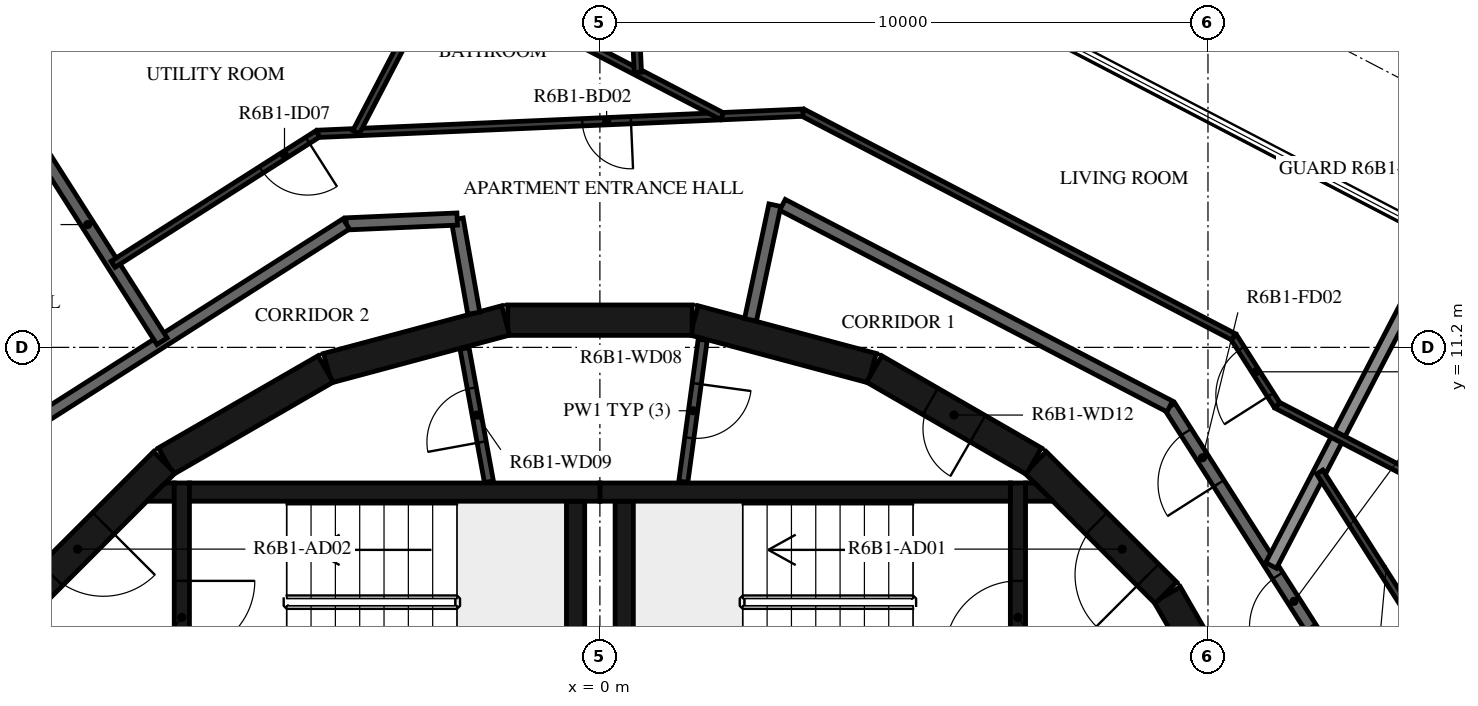
"""IFC4 building model, lengths in metres.
Left out: names, types, materials, properties, quantities, classifications, styles, units other than length and angle.
Written with IfcOpenShell. Run it as: python <this file> out.ifc"""

import sys

from ifc_helpers import new_model, si_unit, direction, frame, frame_2d, origin, place, context, subcontext, project, spatial, polyline, rectangle, outline, extrude, element, fill, save


model = new_model("IFC4")
c1 = context("Model", 3, precision=1e-05, world=origin(), true_north=direction((0.0, 1.0)))
c2 = subcontext(c1, "Body", "Model", "MODEL_VIEW")
j1 = project(units=[si_unit("LENGTHUNIT", "METRE"), si_unit("PLANEANGLEUNIT", "RADIAN")], contexts=[c1])
p1 = place(None, origin())
s1 = spatial("IfcSite", under=j1, at=p1, CompositionType="ELEMENT")
p2 = place(p1, origin())
s2 = spatial("IfcBuilding", under=s1, at=p2, CompositionType="ELEMENT")
p3 = place(p2, frame((0.0, 0.0, 237.2)))
s3 = spatial("IfcBuildingStorey", under=s2, at=p3, CompositionType="ELEMENT", Elevation=237.2)
p4 = place(p3, frame((10.845, 4.51, 0.0), z_axis=(0.0, 0.0, 1.0), x_axis=(-0.500087131594, 0.865975092491, 0.0)))
e1 = element("IfcWall", 1, at=p4, inside=s3, PredefinedType="SHEAR", context=c2, shape_type="SweptSolid", body=[
    extrude(rectangle(XDim=3.033, YDim=0.5, at=frame_2d((1.516, 0.0))), origin(), (0.0, 0.0, 1.0), 3.12),
])
p5 = place(p3, frame((9.308, 7.164, 0.0), z_axis=(0.0, 0.0, 1.0), x_axis=(-0.707106781187, 0.707106781187, 0.0)))
e2 = element("IfcWall", 2, at=p5, inside=s3, PredefinedType="SHEAR", context=c2, shape_type="SweptSolid", body=[
    extrude(rectangle(XDim=3.032, YDim=0.5, at=frame_2d((1.516, 0.0))), origin(), (0.0, 0.0, 1.0), 3.12),
])
p6 = place(p5, frame((0.416, 0.0, 0.0)))
e3 = element("IfcOpeningElement", 3, at=p6, cuts=e2, PredefinedType="OPENING", context=c2, shape_type="SweptSolid", body=[
    extrude(rectangle(XDim=1.2, YDim=2.1, at=frame_2d((0.6, 1.05))), frame((0.0, 0.26, 0.0), z_axis=(0.0, -1.0, 0.0), x_axis=(1.0, 0.0, 0.0)), (0.0, 0.0, 1.0), 0.52),
])
p7 = place(p3, frame((7.137, 9.329, 0.0), z_axis=(0.0, 0.0, 1.0), x_axis=(-0.865975092491, 0.500087131594, 0.0)))
e4 = element("IfcWall", 4, at=p7, inside=s3, PredefinedType="SHEAR", context=c2, shape_type="SweptSolid", body=[
    extrude(rectangle(XDim=3.033, YDim=0.5, at=frame_2d((1.516, 0.0))), origin(), (0.0, 0.0, 1.0), 3.12),
])
p8 = place(p7, frame((1.066, 0.0, 0.0)))
e5 = element("IfcOpeningElement", 5, at=p8, cuts=e4, PredefinedType="OPENING", context=c2, shape_type="SweptSolid", body=[
    extrude(rectangle(XDim=0.9, YDim=2.1, at=frame_2d((0.45, 1.05))), frame((0.0, 0.26, 0.0), z_axis=(0.0, -1.0, 0.0), x_axis=(1.0, 0.0, 0.0)), (0.0, 0.0, 1.0), 0.52),
])
for number, where, z_axis, x_axis in (
    (6, (4.479, 10.858, 0.0), (0.0, 0.0, 1.0), (-0.966, 0.259, 0.0)),
    (7, (1.516, 11.647, 0.0), (0.0, 0.0, 1.0), (-1.0, 0.0, 0.0)),
    (8, (-1.55, 11.643, 0.0), (0.0, 0.0, 1.0), (-0.966, -0.259, 0.0)),
    (9, (-4.51, 10.845, 0.0), (0.0, 0.0, 1.0), (-0.866, -0.5, 0.0)),
):
    element("IfcWall", number, at=place(p3, frame(where, z_axis=z_axis, x_axis=x_axis)), inside=s3, PredefinedType="SHEAR", context=c2, shape_type="SweptSolid", body=[
        extrude(rectangle(XDim=3.033, YDim=0.5, at=frame_2d((1.516, 0.0))), origin(), (0.0, 0.0, 1.0), 3.12),
    ])
p9 = place(p3, frame((-7.164, 9.308, 0.0), z_axis=(0.0, 0.0, 1.0), x_axis=(-0.707106781187, -0.707106781187, 0.0)))
e10 = element("IfcWall", 10, at=p9, inside=s3, PredefinedType="SHEAR", context=c2, shape_type="SweptSolid", body=[
    extrude(rectangle(XDim=3.032, YDim=0.5, at=frame_2d((1.516, 0.0))), origin(), (0.0, 0.0, 1.0), 3.12),
])
p10 = place(p9, frame((1.416, 0.0, 0.0)))
e11 = element("IfcOpeningElement", 11, at=p10, cuts=e10, PredefinedType="OPENING", context=c2, shape_type="SweptSolid", body=[
    extrude(rectangle(XDim=1.2, YDim=2.1, at=frame_2d((0.6, 1.05))), frame((0.0, 0.26, 0.0), z_axis=(0.0, -1.0, 0.0), x_axis=(1.0, 0.0, 0.0)), (0.0, 0.0, 1.0), 0.52),
])
p11 = place(p3, frame((0.0, 8.82, 0.0), z_axis=(0.0, 0.0, 1.0), x_axis=(1.0, 0.0, 0.0)))
e12 = element("IfcWall", 12, at=p11, inside=s3, PredefinedType="SHEAR", context=c2, shape_type="SweptSolid", body=[
    extrude(rectangle(XDim=6.75, YDim=0.3, at=frame_2d((3.375, 0.0))), origin(), (0.0, 0.0, 1.0), 3.12),
])
p12 = place(p3, frame((0.4, 5.35, 0.0), z_axis=(0.0, 0.0, 1.0), x_axis=(0.0, 1.0, 0.0)))
e13 = element("IfcWall", 13, at=p12, inside=s3, PredefinedType="SHEAR", context=c2, shape_type="SweptSolid", body=[
    extrude(rectangle(XDim=3.32, YDim=0.3, at=frame_2d((1.66, 0.0))), origin(), (0.0, 0.0, 1.0), 3.12),
])
p13 = place(p3, frame((6.875, 5.05, 0.0), z_axis=(0.0, 0.0, 1.0), x_axis=(0.0, 1.0, 0.0)))
e14 = element("IfcWall", 14, at=p13, inside=s3, PredefinedType="SHEAR", context=c2, shape_type="SweptSolid", body=[
    extrude(rectangle(XDim=3.92, YDim=0.25, at=frame_2d((1.96, 0.0))), origin(), (0.0, 0.0, 1.0), 3.12),
])
p14 = place(p13, frame((1.11, 0.0, 0.0)))
e15 = element("IfcOpeningElement", 15, at=p14, cuts=e14, PredefinedType="OPENING", context=c2, shape_type="SweptSolid", body=[
    extrude(rectangle(XDim=1.2, YDim=2.1, at=frame_2d((0.6, 1.05))), frame((0.0, 0.135, 0.0), z_axis=(0.0, -1.0, 0.0), x_axis=(1.0, 0.0, 0.0)), (0.0, 0.0, 1.0), 0.27),
])
p15 = place(p3, origin())
e16 = element("IfcWall", 16, at=p15, inside=s3, PredefinedType="SHEAR", context=c2, shape_type="SweptSolid", body=[
    extrude(outline(polyline([(7.448, 8.67), (7.0, 8.67), (7.0, 8.97), (7.148, 8.97), (7.448, 8.67)])), origin(), (0.0, 0.0, 1.0), 3.12),
])
p16 = place(p3, frame((-6.75, 8.82, 0.0), z_axis=(0.0, 0.0, 1.0), x_axis=(1.0, 0.0, 0.0)))
e17 = element("IfcWall", 17, at=p16, inside=s3, PredefinedType="SHEAR", context=c2, shape_type="SweptSolid", body=[
    extrude(rectangle(XDim=6.75, YDim=0.3, at=frame_2d((3.375, 0.0))), origin(), (0.0, 0.0, 1.0), 3.12),
])
p17 = place(p3, frame((-0.4, 5.35, 0.0), z_axis=(0.0, 0.0, 1.0), x_axis=(0.0, 1.0, 0.0)))
e18 = element("IfcWall", 18, at=p17, inside=s3, PredefinedType="SHEAR", context=c2, shape_type="SweptSolid", body=[
    extrude(rectangle(XDim=3.32, YDim=0.3, at=frame_2d((1.66, 0.0))), origin(), (0.0, 0.0, 1.0), 3.12),
])
p18 = place(p3, frame((-6.875, 8.97, 0.0), z_axis=(0.0, 0.0, 1.0), x_axis=(0.0, -1.0, 0.0)))
e19 = element("IfcWall", 19, at=p18, inside=s3, PredefinedType="SHEAR", context=c2, shape_type="SweptSolid", body=[
    extrude(rectangle(XDim=3.92, YDim=0.25, at=frame_2d((1.96, 0.0))), origin(), (0.0, 0.0, 1.0), 3.12),
])
p19 = place(p18, frame((1.61, 0.0, 0.0)))
e20 = element("IfcOpeningElement", 20, at=p19, cuts=e19, PredefinedType="OPENING", context=c2, shape_type="SweptSolid", body=[
    extrude(rectangle(XDim=1.2, YDim=2.1, at=frame_2d((0.6, 1.05))), frame((0.0, 0.135, 0.0), z_axis=(0.0, -1.0, 0.0), x_axis=(1.0, 0.0, 0.0)), (0.0, 0.0, 1.0), 0.27),
])
p20 = place(p3, origin())
e21 = element("IfcWall", 21, at=p20, inside=s3, PredefinedType="SHEAR", context=c2, shape_type="SweptSolid", body=[
    extrude(outline(polyline([(-7.148, 8.97), (-7.0, 8.97), (-7.0, 8.67), (-7.448, 8.67), (-7.148, 8.97)])), origin(), (0.0, 0.0, 1.0), 3.12),
])
p21 = place(p3, frame((1.691, 11.326, 0.0), z_axis=(0.0, 0.0, 1.0), x_axis=(-0.135344253201, -0.990798633994, 0.0)))
e22 = element("IfcWall", 22, at=p21, inside=s3, PredefinedType="PARTITIONING", context=c2, shape_type="SweptSolid", body=[
    extrude(rectangle(XDim=2.358, YDim=0.15, at=frame_2d((1.179, 0.0))), origin(), (0.0, 0.0, 1.0), 3.12),
])
p22 = place(p21, frame((0.729, 0.0, 0.0)))
e23 = element("IfcOpeningElement", 23, at=p22, cuts=e22, PredefinedType="OPENING", context=c2, shape_type="SweptSolid", body=[
    extrude(rectangle(XDim=0.9, YDim=2.1, at=frame_2d((0.45, 1.05))), frame((0.0, 0.085, 0.0), z_axis=(0.0, -1.0, 0.0), x_axis=(1.0, 0.0, 0.0)), (0.0, 0.0, 1.0), 0.17),
])
p23 = place(p3, frame((-1.825, 8.99, 0.0), z_axis=(0.0, 0.0, 1.0), x_axis=(-0.179955206115, 0.983674805915, 0.0)))
e24 = element("IfcWall", 24, at=p23, inside=s3, PredefinedType="PARTITIONING", context=c2, shape_type="SweptSolid", body=[
    extrude(rectangle(XDim=2.229, YDim=0.15, at=frame_2d((1.115, 0.0))), origin(), (0.0, 0.0, 1.0), 3.12),
])
p24 = place(p23, frame((0.665, 0.0, 0.0)))
e25 = element("IfcOpeningElement", 25, at=p24, cuts=e24, PredefinedType="OPENING", context=c2, shape_type="SweptSolid", body=[
    extrude(rectangle(XDim=0.9, YDim=2.1, at=frame_2d((0.45, 1.05))), frame((0.0, 0.085, 0.0), z_axis=(0.0, -1.0, 0.0), x_axis=(1.0, 0.0, 0.0)), (0.0, 0.0, 1.0), 0.17),
])
p25 = place(p3, frame((13.231, 4.172, 0.0), z_axis=(0.0, 0.0, 1.0), x_axis=(-0.537304397561, 0.843388394728, 0.0)))
e26 = element("IfcWall", 26, at=p25, inside=s3, PredefinedType="STANDARD", context=c2, shape_type="SweptSolid", body=[
    extrude(rectangle(XDim=7.181, YDim=0.2, at=frame_2d((3.59, 0.0))), origin(), (0.0, 0.0, 1.0), 3.12),
])
p26 = place(p25, frame((2.881, 0.0, 0.0)))
e27 = element("IfcOpeningElement", 27, at=p26, cuts=e26, PredefinedType="OPENING", context=c2, shape_type="SweptSolid", body=[
    extrude(rectangle(XDim=1.0, YDim=2.1, at=frame_2d((0.5, 1.05))), frame((0.0, 0.11, 0.0), z_axis=(0.0, -1.0, 0.0), x_axis=(1.0, 0.0, 0.0)), (0.0, 0.0, 1.0), 0.22),
])
p27 = place(p25, frame((5.681, 0.0, 0.0)))
e28 = element("IfcOpeningElement", 28, at=p27, cuts=e26, PredefinedType="OPENING", context=c2, shape_type="SweptSolid", body=[
    extrude(rectangle(XDim=1.0, YDim=2.1, at=frame_2d((0.5, 1.05))), frame((0.0, 0.11, 0.0), z_axis=(0.0, -1.0, 0.0), x_axis=(1.0, 0.0, 0.0)), (0.0, 0.0, 1.0), 0.22),
])
p28 = place(p3, frame((9.372, 10.228, 0.0), z_axis=(0.0, 0.0, 1.0), x_axis=(-0.887005184532, 0.461759464021, 0.0)))
e29 = element("IfcWall", 29, at=p28, inside=s3, PredefinedType="STANDARD", context=c2, shape_type="SweptSolid", body=[
    extrude(rectangle(XDim=7.181, YDim=0.2, at=frame_2d((3.591, 0.0))), origin(), (0.0, 0.0, 1.0), 3.12),
])
p29 = place(p3, frame((2.878, 13.538, 0.0), z_axis=(0.0, 0.0, 1.0), x_axis=(-0.207893604596, -0.978151444904, 0.0)))
e30 = element("IfcWall", 30, at=p29, inside=s3, PredefinedType="STANDARD", context=c2, shape_type="SweptSolid", body=[
    extrude(rectangle(XDim=1.927, YDim=0.2, at=frame_2d((0.963, 0.0))), origin(), (0.0, 0.0, 1.0), 3.12),
])
p30 = place(p3, frame((-2.074, 11.761, 0.0), z_axis=(0.0, 0.0, 1.0), x_axis=(-0.173679082312, 0.984802303189, 0.0)))
e31 = element("IfcWall", 31, at=p30, inside=s3, PredefinedType="STANDARD", context=c2, shape_type="SweptSolid", body=[
    extrude(rectangle(XDim=1.573, YDim=0.2, at=frame_2d((0.787, 0.0))), origin(), (0.0, 0.0, 1.0), 3.12),
])
p31 = place(p3, frame((-2.347, 13.31, 0.0), z_axis=(0.0, 0.0, 1.0), x_axis=(-0.999050095671, -0.043576442492, 0.0)))
e32 = element("IfcWall", 32, at=p31, inside=s3, PredefinedType="STANDARD", context=c2, shape_type="SweptSolid", body=[
    extrude(rectangle(XDim=1.826, YDim=0.2, at=frame_2d((0.913, 0.0))), origin(), (0.0, 0.0, 1.0), 3.12),
])
p32 = place(p3, frame((-4.172, 13.231, 0.0), z_axis=(0.0, 0.0, 1.0), x_axis=(-0.843388394728, -0.537304397561, 0.0)))
e33 = element("IfcWall", 33, at=p32, inside=s3, PredefinedType="STANDARD", context=c2, shape_type="SweptSolid", body=[
    extrude(rectangle(XDim=7.181, YDim=0.2, at=frame_2d((3.59, 0.0))), origin(), (0.0, 0.0, 1.0), 3.12),
])
p33 = place(p3, frame((13.801, 12.922, 0.0), z_axis=(0.0, 0.0, 1.0), x_axis=(-0.461726485624, -0.887022351733, 0.0)))
e34 = element("IfcWall", 34, at=p33, inside=s3, PredefinedType="STANDARD", context=c2, shape_type="SweptSolid", body=[
    extrude(rectangle(XDim=5.984, YDim=0.2, at=frame_2d((2.992, 0.0))), origin(), (0.0, 0.0, 1.0), 2.73),
])
p34 = place(p3, frame((-9.645, 15.138, 0.0), z_axis=(0.0, 0.0, 1.0), x_axis=(0.537267800866, -0.84341170857, 0.0)))
e35 = element("IfcWall", 35, at=p34, inside=s3, PredefinedType="STANDARD", context=c2, shape_type="SweptSolid", body=[
    extrude(rectangle(XDim=4.55, YDim=0.2, at=frame_2d((2.275, 0.0))), origin(), (0.0, 0.0, 1.0), 3.12),
])
p35 = place(p3, frame((14.58, 4.845, 0.0), z_axis=(0.0, 0.0, 1.0), x_axis=(-0.537283960997, 0.84340141407, 0.0)))
e36 = element("IfcWall", 36, at=p35, inside=s3, PredefinedType="PARTITIONING", context=c2, shape_type="SweptSolid", body=[
    extrude(rectangle(XDim=5.104, YDim=0.12, at=frame_2d((2.552, 0.0))), origin(), (0.0, 0.0, 1.0), 3.12),
])
p36 = place(p35, frame((0.2, 0.0, 0.0)))
e37 = element("IfcOpeningElement", 37, at=p36, cuts=e36, PredefinedType="OPENING", context=c2, shape_type="SweptSolid", body=[
    extrude(rectangle(XDim=0.8, YDim=2.1, at=frame_2d((0.4, 1.05))), frame((0.0, 0.07, 0.0), z_axis=(0.0, -1.0, 0.0), x_axis=(1.0, 0.0, 0.0)), (0.0, 0.0, 1.0), 0.14),
])
p37 = place(p3, frame((21.496, 4.858, 0.0), z_axis=(0.0, 0.0, 1.0), x_axis=(-0.887020940825, 0.461729196107, 0.0)))
e38 = element("IfcWall", 38, at=p37, inside=s3, PredefinedType="PARTITIONING", context=c2, shape_type="SweptSolid", body=[
    extrude(rectangle(XDim=11.678, YDim=0.12, at=frame_2d((5.839, 0.0))), origin(), (0.0, 0.0, 1.0), 3.12),
])
p38 = place(p37, frame((1.251, 0.0, 0.0)))
e39 = element("IfcOpeningElement", 39, at=p38, cuts=e38, PredefinedType="OPENING", context=c2, shape_type="SweptSolid", body=[
    extrude(rectangle(XDim=0.9, YDim=2.1, at=frame_2d((0.45, 1.05))), frame((0.0, 0.07, 0.0), z_axis=(0.0, -1.0, 0.0), x_axis=(1.0, 0.0, 0.0)), (0.0, 0.0, 1.0), 0.14),
])
p39 = place(p37, frame((3.341, 0.0, 0.0)))
e40 = element("IfcOpeningElement", 40, at=p39, cuts=e38, PredefinedType="OPENING", context=c2, shape_type="SweptSolid", body=[
    extrude(rectangle(XDim=0.9, YDim=2.1, at=frame_2d((0.45, 1.05))), frame((0.0, 0.07, 0.0), z_axis=(0.0, -1.0, 0.0), x_axis=(1.0, 0.0, 0.0)), (0.0, 0.0, 1.0), 0.14),
])
p40 = place(p3, frame((11.137, 10.25, 0.0), z_axis=(0.0, 0.0, 1.0), x_axis=(-0.537231369635, 0.843434914786, 0.0)))
e41 = element("IfcWall", 41, at=p40, inside=s3, PredefinedType="PARTITIONING", context=c2, shape_type="SweptSolid", body=[
    extrude(rectangle(XDim=1.332, YDim=0.12, at=frame_2d((0.666, 0.0))), origin(), (0.0, 0.0, 1.0), 3.12),
])
p41 = place(p40, frame((0.2, 0.0, 0.0)))
e42 = element("IfcOpeningElement", 42, at=p41, cuts=e41, PredefinedType="OPENING", context=c2, shape_type="SweptSolid", body=[
    extrude(rectangle(XDim=0.9, YDim=2.1, at=frame_2d((0.45, 1.05))), frame((0.0, 0.07, 0.0), z_axis=(0.0, -1.0, 0.0), x_axis=(1.0, 0.0, 0.0)), (0.0, 0.0, 1.0), 0.14),
])
p42 = place(p3, frame((10.421, 11.373, 0.0), z_axis=(0.0, 0.0, 1.0), x_axis=(-0.887012970857, 0.461744506769, 0.0)))
e43 = element("IfcWall", 43, at=p42, inside=s3, PredefinedType="PARTITIONING", context=c2, shape_type="SweptSolid", body=[
    extrude(rectangle(XDim=7.985, YDim=0.12, at=frame_2d((3.992, 0.0))), origin(), (0.0, 0.0, 1.0), 3.12),
])
p43 = place(p3, frame((3.339, 15.06, 0.0), z_axis=(0.0, 0.0, 1.0), x_axis=(-0.999047716945, -0.043630943905, 0.0)))
e44 = element("IfcWall", 44, at=p43, inside=s3, PredefinedType="PARTITIONING", context=c2, shape_type="SweptSolid", body=[
    extrude(rectangle(XDim=7.985, YDim=0.12, at=frame_2d((3.992, 0.0))), origin(), (0.0, 0.0, 1.0), 3.12),
])
p44 = place(p43, frame((2.831, 0.0, 0.0)))
e45 = element("IfcOpeningElement", 45, at=p44, cuts=e44, PredefinedType="OPENING", context=c2, shape_type="SweptSolid", body=[
    extrude(rectangle(XDim=0.8, YDim=2.1, at=frame_2d((0.4, 1.05))), frame((0.0, 0.07, 0.0), z_axis=(0.0, -1.0, 0.0), x_axis=(1.0, 0.0, 0.0)), (0.0, 0.0, 1.0), 0.14),
])
p45 = place(p3, frame((-4.639, 14.712, 0.0), z_axis=(0.0, 0.0, 1.0), x_axis=(-0.843376843237, -0.537322529113, 0.0)))
e46 = element("IfcWall", 46, at=p45, inside=s3, PredefinedType="PARTITIONING", context=c2, shape_type="SweptSolid", body=[
    extrude(rectangle(XDim=3.992, YDim=0.12, at=frame_2d((1.996, 0.0))), origin(), (0.0, 0.0, 1.0), 3.12),
])
p46 = place(p45, frame((0.2, 0.0, 0.0)))
e47 = element("IfcOpeningElement", 47, at=p46, cuts=e46, PredefinedType="OPENING", context=c2, shape_type="SweptSolid", body=[
    extrude(rectangle(XDim=0.9, YDim=2.1, at=frame_2d((0.45, 1.05))), frame((0.0, 0.07, 0.0), z_axis=(0.0, -1.0, 0.0), x_axis=(1.0, 0.0, 0.0)), (0.0, 0.0, 1.0), 0.14),
])
p47 = place(p3, frame((-8.35, 20.394, 0.0), z_axis=(0.0, 0.0, 1.0), x_axis=(0.887020940825, -0.461729196107, 0.0)))
e48 = element("IfcWall", 48, at=p47, inside=s3, PredefinedType="PARTITIONING", context=c2, shape_type="SweptSolid", body=[
    extrude(rectangle(XDim=11.678, YDim=0.12, at=frame_2d((5.839, 0.0))), origin(), (0.0, 0.0, 1.0), 3.12),
])
p48 = place(p47, frame((3.469, 0.0, 0.0)))
e49 = element("IfcOpeningElement", 49, at=p48, cuts=e48, PredefinedType="OPENING", context=c2, shape_type="SweptSolid", body=[
    extrude(rectangle(XDim=0.9, YDim=2.1, at=frame_2d((0.45, 1.05))), frame((0.0, 0.07, 0.0), z_axis=(0.0, -1.0, 0.0), x_axis=(1.0, 0.0, 0.0)), (0.0, 0.0, 1.0), 0.14),
])
p49 = place(p3, frame((0.442, 19.876, 0.0), z_axis=(0.0, 0.0, 1.0), x_axis=(0.043638577658, -0.999047383531, 0.0)))
e50 = element("IfcWall", 50, at=p49, inside=s3, PredefinedType="PARTITIONING", context=c2, shape_type="SweptSolid", body=[
    extrude(rectangle(XDim=4.157, YDim=0.12, at=frame_2d((2.078, 0.0))), origin(), (0.0, 0.0, 1.0), 3.12),
])
p50 = place(p3, frame((-2.619, 17.411, 0.0), z_axis=(0.0, 0.0, 1.0), x_axis=(-0.461743141736, -0.887013681439, 0.0)))
e51 = element("IfcWall", 51, at=p50, inside=s3, PredefinedType="PARTITIONING", context=c2, shape_type="SweptSolid", body=[
    extrude(rectangle(XDim=3.012, YDim=0.12, at=frame_2d((1.506, 0.0))), origin(), (0.0, 0.0, 1.0), 3.12),
])
p51 = place(p14, origin())
e52 = element("IfcDoor", 52, at=p51, inside=s3, OperationType="SINGLE_SWING_LEFT", PredefinedType="DOOR", context=c2, shape_type="SweptSolid", body=[
    extrude(rectangle(XDim=1.2, YDim=2.1, at=frame_2d((0.6, 1.05))), frame((0.0, 0.025, 0.0), z_axis=(0.0, -1.0, 0.0), x_axis=(1.0, 0.0, 0.0)), (0.0, 0.0, 1.0), 0.05),
])
fill(e15, e52)
p52 = place(p6, origin())
e53 = element("IfcDoor", 53, at=p52, inside=s3, OperationType="SINGLE_SWING_RIGHT", PredefinedType="DOOR", context=c2, shape_type="SweptSolid", body=[
    extrude(rectangle(XDim=1.2, YDim=2.1, at=frame_2d((0.6, 1.05))), frame((0.0, 0.025, 0.0), z_axis=(0.0, -1.0, 0.0), x_axis=(1.0, 0.0, 0.0)), (0.0, 0.0, 1.0), 0.05),
])
fill(e3, e53)
p53 = place(p19, origin())
e54 = element("IfcDoor", 54, at=p53, inside=s3, OperationType="SINGLE_SWING_LEFT", PredefinedType="DOOR", context=c2, shape_type="SweptSolid", body=[
    extrude(rectangle(XDim=1.2, YDim=2.1, at=frame_2d((0.6, 1.05))), frame((0.0, 0.025, 0.0), z_axis=(0.0, -1.0, 0.0), x_axis=(1.0, 0.0, 0.0)), (0.0, 0.0, 1.0), 0.05),
])
fill(e20, e54)
p54 = place(p10, origin())
e55 = element("IfcDoor", 55, at=p54, inside=s3, OperationType="SINGLE_SWING_RIGHT", PredefinedType="DOOR", context=c2, shape_type="SweptSolid", body=[
    extrude(rectangle(XDim=1.2, YDim=2.1, at=frame_2d((0.6, 1.05))), frame((0.0, 0.025, 0.0), z_axis=(0.0, -1.0, 0.0), x_axis=(1.0, 0.0, 0.0)), (0.0, 0.0, 1.0), 0.05),
])
fill(e11, e55)
p55 = place(p22, origin())
e56 = element("IfcDoor", 56, at=p55, inside=s3, OperationType="SINGLE_SWING_RIGHT", PredefinedType="DOOR", context=c2, shape_type="SweptSolid", body=[
    extrude(rectangle(XDim=0.9, YDim=2.1, at=frame_2d((0.45, 1.05))), frame((0.0, 0.025, 0.0), z_axis=(0.0, -1.0, 0.0), x_axis=(1.0, 0.0, 0.0)), (0.0, 0.0, 1.0), 0.05),
])
fill(e23, e56)
p56 = place(p24, origin())
e57 = element("IfcDoor", 57, at=p56, inside=s3, OperationType="SINGLE_SWING_LEFT", PredefinedType="DOOR", context=c2, shape_type="SweptSolid", body=[
    extrude(rectangle(XDim=0.9, YDim=2.1, at=frame_2d((0.45, 1.05))), frame((0.0, 0.025, 0.0), z_axis=(0.0, -1.0, 0.0), x_axis=(1.0, 0.0, 0.0)), (0.0, 0.0, 1.0), 0.05),
])
fill(e25, e57)
p57 = place(p8, origin())
e58 = element("IfcDoor", 58, at=p57, inside=s3, OperationType="SINGLE_SWING_RIGHT", PredefinedType="DOOR", context=c2, shape_type="SweptSolid", body=[
    extrude(rectangle(XDim=0.9, YDim=2.1, at=frame_2d((0.45, 1.05))), frame((0.0, 0.025, 0.0), z_axis=(0.0, -1.0, 0.0), x_axis=(1.0, 0.0, 0.0)), (0.0, 0.0, 1.0), 0.05),
])
fill(e5, e58)
p58 = place(p26, origin())
e59 = element("IfcDoor", 59, at=p58, inside=s3, OperationType="SINGLE_SWING_LEFT", PredefinedType="DOOR", context=c2, shape_type="SweptSolid", body=[
    extrude(rectangle(XDim=1.0, YDim=2.1, at=frame_2d((0.5, 1.05))), frame((0.0, 0.025, 0.0), z_axis=(0.0, -1.0, 0.0), x_axis=(1.0, 0.0, 0.0)), (0.0, 0.0, 1.0), 0.05),
])
fill(e27, e59)
p59 = place(p27, origin())
e60 = element("IfcDoor", 60, at=p59, inside=s3, OperationType="SINGLE_SWING_LEFT", PredefinedType="DOOR", context=c2, shape_type="SweptSolid", body=[
    extrude(rectangle(XDim=1.0, YDim=2.1, at=frame_2d((0.5, 1.05))), frame((0.0, 0.025, 0.0), z_axis=(0.0, -1.0, 0.0), x_axis=(1.0, 0.0, 0.0)), (0.0, 0.0, 1.0), 0.05),
])
fill(e28, e60)
p60 = place(p41, origin())
e61 = element("IfcDoor", 61, at=p60, inside=s3, OperationType="SINGLE_SWING_LEFT", PredefinedType="DOOR", context=c2, shape_type="SweptSolid", body=[
    extrude(rectangle(XDim=0.9, YDim=2.1, at=frame_2d((0.45, 1.05))), frame((0.0, 0.025, 0.0), z_axis=(0.0, -1.0, 0.0), x_axis=(1.0, 0.0, 0.0)), (0.0, 0.0, 1.0), 0.05),
])
fill(e42, e61)
p61 = place(p44, origin())
e62 = element("IfcDoor", 62, at=p61, inside=s3, OperationType="SINGLE_SWING_RIGHT", PredefinedType="DOOR", context=c2, shape_type="SweptSolid", body=[
    extrude(rectangle(XDim=0.8, YDim=2.1, at=frame_2d((0.4, 1.05))), frame((0.0, 0.025, 0.0), z_axis=(0.0, -1.0, 0.0), x_axis=(1.0, 0.0, 0.0)), (0.0, 0.0, 1.0), 0.05),
])
fill(e45, e62)
p62 = place(p46, origin())
e63 = element("IfcDoor", 63, at=p62, inside=s3, OperationType="SINGLE_SWING_RIGHT", PredefinedType="DOOR", context=c2, shape_type="SweptSolid", body=[
    extrude(rectangle(XDim=0.9, YDim=2.1, at=frame_2d((0.45, 1.05))), frame((0.0, 0.025, 0.0), z_axis=(0.0, -1.0, 0.0), x_axis=(1.0, 0.0, 0.0)), (0.0, 0.0, 1.0), 0.05),
])
fill(e47, e63)
save(model, sys.argv[1])
